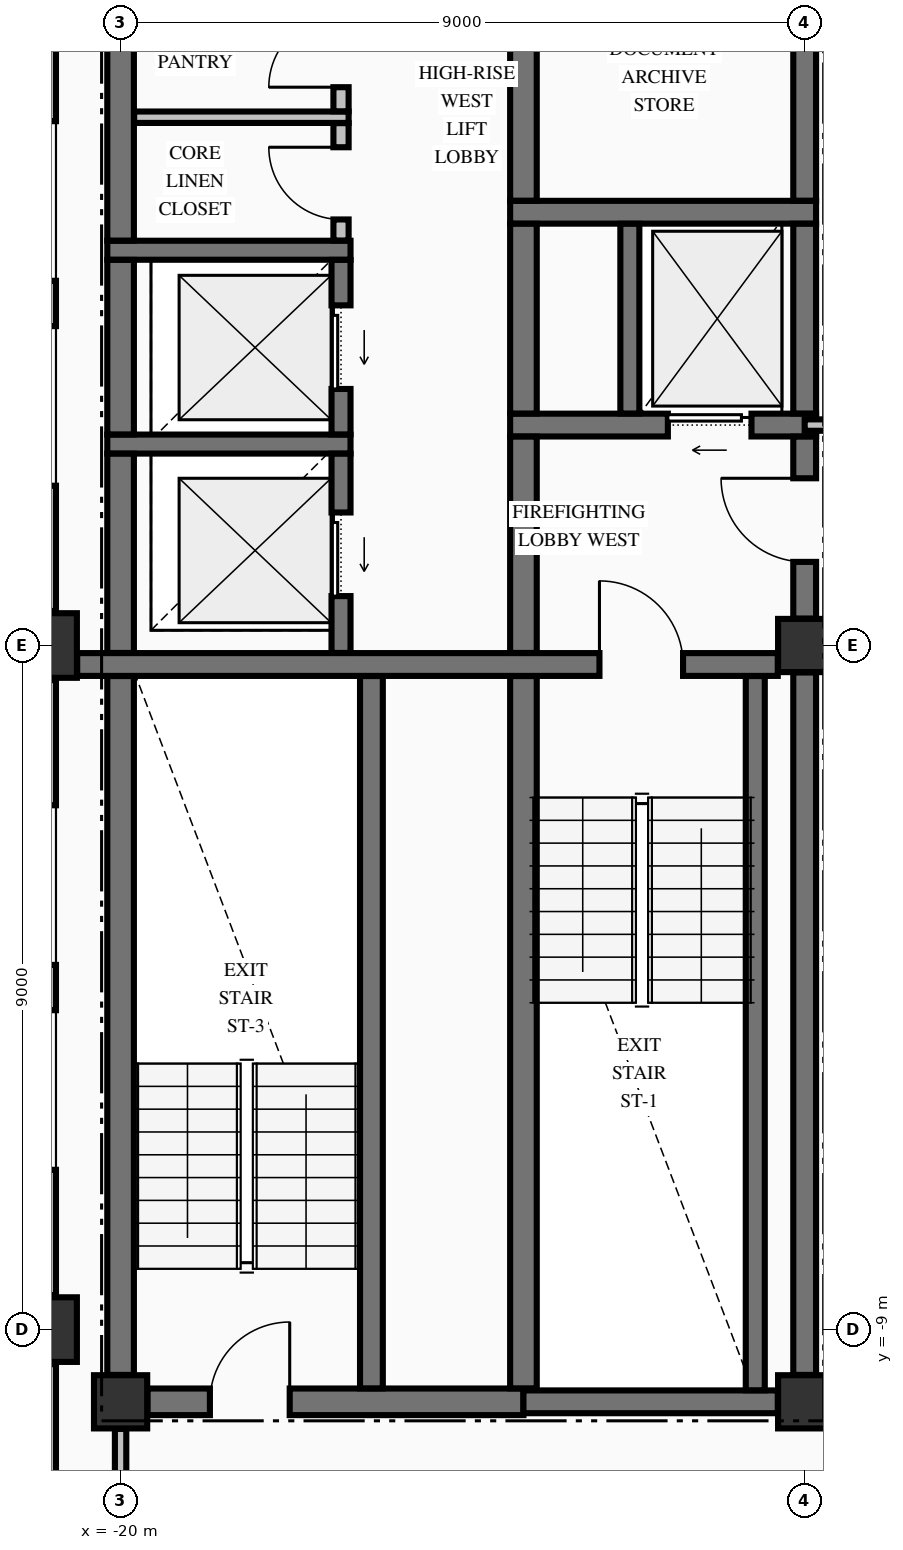
"""IFC4 building model, lengths in metres.
Left out: names, types, materials, properties, quantities, classifications, styles, units other than length and angle.
Written with IfcOpenShell. Run it as: python <this file> out.ifc"""

import sys

from ifc_helpers import new_model, si_unit, direction, frame, frame_2d, origin, origin_2d, place, context, subcontext, project, spatial, rectangle, extrude, element, fill, save


model = new_model("IFC4")
c1 = context("Model", 3, precision=1e-05, world=origin(), true_north=direction((0.0, 1.0)))
c2 = subcontext(c1, "Body", "Model", "MODEL_VIEW")
j1 = project(units=[si_unit("LENGTHUNIT", "METRE"), si_unit("PLANEANGLEUNIT", "RADIAN")], contexts=[c1])
p1 = place(None, origin())
s1 = spatial("IfcSite", under=j1, at=p1, CompositionType="ELEMENT")
p2 = place(p1, origin())
s2 = spatial("IfcBuilding", under=s1, at=p2, CompositionType="ELEMENT")
p3 = place(p2, frame((0.0, 0.0, 242.97)))
s3 = spatial("IfcBuildingStorey", under=s2, at=p3, CompositionType="ELEMENT", Elevation=242.97)
for number, where, z_axis, x_axis in (
    (1, (-21.0, -9.0, -0.25), (0.0, 0.0, 1.0), (1.0, 0.0, 0.0)),
    (2, (-21.0, 0.0, -0.25), (0.0, 0.0, 1.0), (1.0, 0.0, 0.0)),
):
    element("IfcColumn", number, at=place(p3, frame(where, z_axis=z_axis, x_axis=x_axis)), inside=s3, PredefinedType="COLUMN", context=c2, shape_type="SweptSolid", body=[
        extrude(rectangle(XDim=0.85, YDim=0.85, at=origin_2d()), origin(), (0.0, 0.0, 1.0), 3.23),
    ])
for number, where, z_axis, x_axis in (
    (3, (-20.0, -9.95, -0.25), (0.0, 0.0, 1.0), (1.0, 0.0, 0.0)),
    (4, (-11.0, -9.95, -0.25), (0.0, 0.0, 1.0), (1.0, 0.0, 0.0)),
    (5, (-11.0, 0.0, -0.25), (0.0, 0.0, 1.0), (1.0, 0.0, 0.0)),
):
    element("IfcColumn", number, at=place(p3, frame(where, z_axis=z_axis, x_axis=x_axis)), inside=s3, PredefinedType="COLUMN", context=c2, shape_type="SweptSolid", body=[
        extrude(rectangle(XDim=0.7, YDim=0.7, at=origin_2d()), origin(), (0.0, 0.0, 1.0), 3.23),
    ])
p4 = place(p3, frame((-21.0, -9.455, 0.0), z_axis=(0.0, 0.0, 1.0), x_axis=(0.0, -1.0, 0.0)))
e6 = element("IfcWall", 6, at=p4, inside=s3, PredefinedType="STANDARD", context=c2, shape_type="SweptSolid", body=[
    extrude(rectangle(XDim=8.09, YDim=0.3, at=frame_2d((4.045, 0.0))), origin(), (0.0, 0.0, 1.0), 2.372),
])
p5 = place(p3, frame((-21.0, -0.455, 0.0), z_axis=(0.0, 0.0, 1.0), x_axis=(0.0, -1.0, 0.0)))
e7 = element("IfcWall", 7, at=p5, inside=s3, PredefinedType="STANDARD", context=c2, shape_type="SweptSolid", body=[
    extrude(rectangle(XDim=8.09, YDim=0.3, at=frame_2d((4.045, 0.0))), origin(), (0.0, 0.0, 1.0), 2.372),
])
p6 = place(p5, frame((1.647, 0.0, 0.7)))
e8 = element("IfcOpeningElement", 8, at=p6, cuts=e7, PredefinedType="OPENING", context=c2, shape_type="SweptSolid", body=[
    extrude(rectangle(XDim=2.1, YDim=1.5, at=frame_2d((1.05, 0.75))), frame((0.0, 0.16, 0.0), z_axis=(0.0, -1.0, 0.0), x_axis=(1.0, 0.0, 0.0)), (0.0, 0.0, 1.0), 0.32),
])
p7 = place(p5, frame((4.343, 0.0, 0.7)))
e9 = element("IfcOpeningElement", 9, at=p7, cuts=e7, PredefinedType="OPENING", context=c2, shape_type="SweptSolid", body=[
    extrude(rectangle(XDim=2.1, YDim=1.5, at=frame_2d((1.05, 0.75))), frame((0.0, 0.16, 0.0), z_axis=(0.0, -1.0, 0.0), x_axis=(1.0, 0.0, 0.0)), (0.0, 0.0, 1.0), 0.32),
])
p8 = place(p3, frame((-21.0, 8.545, 0.0), z_axis=(0.0, 0.0, 1.0), x_axis=(0.0, -1.0, 0.0)))
e10 = element("IfcWall", 10, at=p8, inside=s3, PredefinedType="STANDARD", context=c2, shape_type="SweptSolid", body=[
    extrude(rectangle(XDim=8.09, YDim=0.3, at=frame_2d((4.045, 0.0))), origin(), (0.0, 0.0, 1.0), 2.372),
])
p9 = place(p8, frame((1.647, 0.0, 0.7)))
e11 = element("IfcOpeningElement", 11, at=p9, cuts=e10, PredefinedType="OPENING", context=c2, shape_type="SweptSolid", body=[
    extrude(rectangle(XDim=2.1, YDim=1.5, at=frame_2d((1.05, 0.75))), frame((0.0, 0.16, 0.0), z_axis=(0.0, -1.0, 0.0), x_axis=(1.0, 0.0, 0.0)), (0.0, 0.0, 1.0), 0.32),
])
p10 = place(p8, frame((4.343, 0.0, 0.7)))
e12 = element("IfcOpeningElement", 12, at=p10, cuts=e10, PredefinedType="OPENING", context=c2, shape_type="SweptSolid", body=[
    extrude(rectangle(XDim=2.1, YDim=1.5, at=frame_2d((1.05, 0.75))), frame((0.0, 0.16, 0.0), z_axis=(0.0, -1.0, 0.0), x_axis=(1.0, 0.0, 0.0)), (0.0, 0.0, 1.0), 0.32),
])
p11 = place(p3, frame((-19.646, -9.95, 0.0), z_axis=(0.0, 0.0, 1.0), x_axis=(1.0, 0.0, 0.0)))
e13 = element("IfcWall", 13, at=p11, inside=s3, PredefinedType="SHEAR", context=c2, shape_type="SweptSolid", body=[
    extrude(rectangle(XDim=4.946, YDim=0.35, at=frame_2d((2.473, 0.0))), origin(), (0.0, 0.0, 1.0), 2.98),
])
p12 = place(p11, frame((0.821, 0.0, 0.0)))
e14 = element("IfcOpeningElement", 14, at=p12, cuts=e13, PredefinedType="OPENING", context=c2, shape_type="SweptSolid", body=[
    extrude(rectangle(XDim=1.05, YDim=2.15, at=frame_2d((0.525, 1.075))), frame((0.0, 0.185, 0.0), z_axis=(0.0, -1.0, 0.0), x_axis=(1.0, 0.0, 0.0)), (0.0, 0.0, 1.0), 0.37),
])
p13 = place(p3, frame((-14.7, -9.95, 0.0), z_axis=(0.0, 0.0, 1.0), x_axis=(1.0, 0.0, 0.0)))
e15 = element("IfcWall", 15, at=p13, inside=s3, PredefinedType="SHEAR", context=c2, shape_type="SweptSolid", body=[
    extrude(rectangle(XDim=3.346, YDim=0.3, at=frame_2d((1.673, 0.0))), origin(), (0.0, 0.0, 1.0), 2.98),
])
p14 = place(p3, frame((-20.571, -0.25, 0.0), z_axis=(0.0, 0.0, 1.0), x_axis=(1.0, 0.0, 0.0)))
e16 = element("IfcWall", 16, at=p14, inside=s3, PredefinedType="SHEAR", context=c2, shape_type="SweptSolid", body=[
    extrude(rectangle(XDim=9.217, YDim=0.3, at=frame_2d((4.608, 0.0))), origin(), (0.0, 0.0, 1.0), 2.98),
])
p15 = place(p14, frame((6.871, 0.0, 0.0)))
e17 = element("IfcOpeningElement", 17, at=p15, cuts=e16, PredefinedType="OPENING", context=c2, shape_type="SweptSolid", body=[
    extrude(rectangle(XDim=1.1, YDim=2.15, at=frame_2d((0.55, 1.075))), frame((0.0, 0.16, 0.0), z_axis=(0.0, -1.0, 0.0), x_axis=(1.0, 0.0, 0.0)), (0.0, 0.0, 1.0), 0.32),
])
p16 = place(p3, frame((-20.175, 2.65, 0.0), z_axis=(0.0, 0.0, 1.0), x_axis=(1.0, 0.0, 0.0)))
e18 = element("IfcWall", 18, at=p16, inside=s3, PredefinedType="SOLIDWALL", context=c2, shape_type="SweptSolid", body=[
    extrude(rectangle(XDim=3.2, YDim=0.25, at=frame_2d((1.6, 0.0))), origin(), (0.0, 0.0, 1.0), 2.98),
])
p17 = place(p3, frame((-14.875, 2.9, 0.0), z_axis=(0.0, 0.0, 1.0), x_axis=(1.0, 0.0, 0.0)))
e19 = element("IfcWall", 19, at=p17, inside=s3, PredefinedType="SHEAR", context=c2, shape_type="SweptSolid", body=[
    extrude(rectangle(XDim=4.025, YDim=0.3, at=frame_2d((2.012, 0.0))), origin(), (0.0, 0.0, 1.0), 2.98),
])
p18 = place(p17, frame((2.075, 0.0, 0.0)))
e20 = element("IfcOpeningElement", 20, at=p18, cuts=e19, PredefinedType="OPENING", context=c2, shape_type="SweptSolid", body=[
    extrude(rectangle(XDim=1.1, YDim=2.2, at=frame_2d((0.55, 1.1))), frame((0.0, 0.16, 0.0), z_axis=(0.0, -1.0, 0.0), x_axis=(1.0, 0.0, 0.0)), (0.0, 0.0, 1.0), 0.32),
])
p19 = place(p3, frame((-20.175, 5.2, 0.0), z_axis=(0.0, 0.0, 1.0), x_axis=(1.0, 0.0, 0.0)))
e21 = element("IfcWall", 21, at=p19, inside=s3, PredefinedType="SOLIDWALL", context=c2, shape_type="SweptSolid", body=[
    extrude(rectangle(XDim=3.2, YDim=0.25, at=frame_2d((1.6, 0.0))), origin(), (0.0, 0.0, 1.0), 2.98),
])
p20 = place(p3, frame((-14.875, 5.7, 0.0), z_axis=(0.0, 0.0, 1.0), x_axis=(1.0, 0.0, 0.0)))
e22 = element("IfcWall", 22, at=p20, inside=s3, PredefinedType="SHEAR", context=c2, shape_type="SweptSolid", body=[
    extrude(rectangle(XDim=4.025, YDim=0.3, at=frame_2d((2.012, 0.0))), origin(), (0.0, 0.0, 1.0), 2.98),
])
p21 = place(p3, frame((-11.0, 2.9, 0.0), z_axis=(0.0, 0.0, 1.0), x_axis=(1.0, 0.0, 0.0)))
e23 = element("IfcWall", 23, at=p21, inside=s3, PredefinedType="PARTITIONING", context=c2, shape_type="SweptSolid", body=[
    extrude(rectangle(XDim=22.0, YDim=0.15, at=frame_2d((11.0, 0.0))), origin(), (0.0, 0.0, 1.0), 2.98),
])
p22 = place(p21, frame((13.9, 0.0, 0.0)))
e24 = element("IfcOpeningElement", 24, at=p22, cuts=e23, PredefinedType="OPENING", context=c2, shape_type="SweptSolid", body=[
    extrude(rectangle(XDim=1.1, YDim=2.15, at=frame_2d((0.55, 1.075))), frame((0.0, 0.085, 0.0), z_axis=(0.0, -1.0, 0.0), x_axis=(1.0, 0.0, 0.0)), (0.0, 0.0, 1.0), 0.17),
])
p23 = place(p21, frame((6.145, 0.0, 0.0)))
e25 = element("IfcOpeningElement", 25, at=p23, cuts=e23, PredefinedType="OPENING", context=c2, shape_type="SweptSolid", body=[
    extrude(rectangle(XDim=1.05, YDim=2.15, at=frame_2d((0.525, 1.075))), frame((0.0, 0.085, 0.0), z_axis=(0.0, -1.0, 0.0), x_axis=(1.0, 0.0, 0.0)), (0.0, 0.0, 1.0), 0.17),
])
p24 = place(p21, frame((18.23, 0.0, 0.0)))
e26 = element("IfcOpeningElement", 26, at=p24, cuts=e23, PredefinedType="OPENING", context=c2, shape_type="SweptSolid", body=[
    extrude(rectangle(XDim=1.1, YDim=2.15, at=frame_2d((0.55, 1.075))), frame((0.0, 0.085, 0.0), z_axis=(0.0, -1.0, 0.0), x_axis=(1.0, 0.0, 0.0)), (0.0, 0.0, 1.0), 0.17),
])
p25 = place(p3, frame((-19.822, 6.95, 0.0), z_axis=(0.0, 0.0, 1.0), x_axis=(1.0, 0.0, 0.0)))
e27 = element("IfcWall", 27, at=p25, inside=s3, PredefinedType="PARTITIONING", context=c2, shape_type="SweptSolid", body=[
    extrude(rectangle(XDim=2.822, YDim=0.15, at=frame_2d((1.411, 0.0))), origin(), (0.0, 0.0, 1.0), 2.98),
])
p26 = place(p3, frame((-20.0, -9.596, 0.0), z_axis=(0.0, 0.0, 1.0), x_axis=(0.0, 1.0, 0.0)))
e28 = element("IfcWall", 28, at=p26, inside=s3, PredefinedType="SHEAR", context=c2, shape_type="SweptSolid", body=[
    extrude(rectangle(XDim=9.194, YDim=0.35, at=frame_2d((4.597, 0.0))), origin(), (0.0, 0.0, 1.0), 2.98),
])
p27 = place(p3, frame((-20.0, -0.098, 0.0), z_axis=(0.0, 0.0, 1.0), x_axis=(0.0, 1.0, 0.0)))
e29 = element("IfcWall", 29, at=p27, inside=s3, PredefinedType="SHEAR", context=c2, shape_type="SweptSolid", body=[
    extrude(rectangle(XDim=2.621, YDim=0.35, at=frame_2d((1.311, 0.0))), origin(), (0.0, 0.0, 1.0), 2.98),
])
p28 = place(p3, frame((-20.0, 2.777, 0.0), z_axis=(0.0, 0.0, 1.0), x_axis=(0.0, 1.0, 0.0)))
e30 = element("IfcWall", 30, at=p28, inside=s3, PredefinedType="SHEAR", context=c2, shape_type="SweptSolid", body=[
    extrude(rectangle(XDim=2.296, YDim=0.35, at=frame_2d((1.148, 0.0))), origin(), (0.0, 0.0, 1.0), 2.98),
])
p29 = place(p3, frame((-20.0, 5.327, 0.0), z_axis=(0.0, 0.0, 1.0), x_axis=(0.0, 1.0, 0.0)))
e31 = element("IfcWall", 31, at=p29, inside=s3, PredefinedType="SHEAR", context=c2, shape_type="SweptSolid", body=[
    extrude(rectangle(XDim=4.819, YDim=0.35, at=frame_2d((2.41, 0.0))), origin(), (0.0, 0.0, 1.0), 2.98),
])
p30 = place(p3, frame((-17.1, -0.098, 0.0), z_axis=(0.0, 0.0, 1.0), x_axis=(0.0, 1.0, 0.0)))
e32 = element("IfcWall", 32, at=p30, inside=s3, PredefinedType="SOLIDWALL", context=c2, shape_type="SweptSolid", body=[
    extrude(rectangle(XDim=2.621, YDim=0.25, at=frame_2d((1.311, 0.0))), origin(), (0.0, 0.0, 1.0), 2.98),
])
p31 = place(p30, frame((0.748, 0.0, 0.0)))
e33 = element("IfcOpeningElement", 33, at=p31, cuts=e32, PredefinedType="OPENING", context=c2, shape_type="SweptSolid", body=[
    extrude(rectangle(XDim=1.1, YDim=2.2, at=frame_2d((0.55, 1.1))), frame((0.0, 0.135, 0.0), z_axis=(0.0, -1.0, 0.0), x_axis=(1.0, 0.0, 0.0)), (0.0, 0.0, 1.0), 0.27),
])
p32 = place(p3, frame((-17.1, 2.777, 0.0), z_axis=(0.0, 0.0, 1.0), x_axis=(0.0, 1.0, 0.0)))
e34 = element("IfcWall", 34, at=p32, inside=s3, PredefinedType="SOLIDWALL", context=c2, shape_type="SweptSolid", body=[
    extrude(rectangle(XDim=2.296, YDim=0.25, at=frame_2d((1.148, 0.0))), origin(), (0.0, 0.0, 1.0), 2.98),
])
p33 = place(p32, frame((0.598, 0.0, 0.0)))
e35 = element("IfcOpeningElement", 35, at=p33, cuts=e34, PredefinedType="OPENING", context=c2, shape_type="SweptSolid", body=[
    extrude(rectangle(XDim=1.1, YDim=2.2, at=frame_2d((0.55, 1.1))), frame((0.0, 0.135, 0.0), z_axis=(0.0, -1.0, 0.0), x_axis=(1.0, 0.0, 0.0)), (0.0, 0.0, 1.0), 0.27),
])
p34 = place(p3, frame((-16.7, -9.773, 0.0), z_axis=(0.0, 0.0, 1.0), x_axis=(0.0, 1.0, 0.0)))
e36 = element("IfcWall", 36, at=p34, inside=s3, PredefinedType="SHEAR", context=c2, shape_type="SweptSolid", body=[
    extrude(rectangle(XDim=9.371, YDim=0.3, at=frame_2d((4.686, 0.0))), origin(), (0.0, 0.0, 1.0), 2.98),
])
p35 = place(p3, frame((-14.7, -9.773, 0.0), z_axis=(0.0, 0.0, 1.0), x_axis=(0.0, 1.0, 0.0)))
e37 = element("IfcWall", 37, at=p35, inside=s3, PredefinedType="SHEAR", context=c2, shape_type="SweptSolid", body=[
    extrude(rectangle(XDim=9.371, YDim=0.35, at=frame_2d((4.686, 0.0))), origin(), (0.0, 0.0, 1.0), 2.98),
])
p36 = place(p3, frame((-14.7, -0.098, 0.0), z_axis=(0.0, 0.0, 1.0), x_axis=(0.0, 1.0, 0.0)))
e38 = element("IfcWall", 38, at=p36, inside=s3, PredefinedType="SHEAR", context=c2, shape_type="SweptSolid", body=[
    extrude(rectangle(XDim=2.846, YDim=0.35, at=frame_2d((1.423, 0.0))), origin(), (0.0, 0.0, 1.0), 2.98),
])
p37 = place(p3, frame((-14.7, 3.052, 0.0), z_axis=(0.0, 0.0, 1.0), x_axis=(0.0, 1.0, 0.0)))
e39 = element("IfcWall", 39, at=p37, inside=s3, PredefinedType="SHEAR", context=c2, shape_type="SweptSolid", body=[
    extrude(rectangle(XDim=2.496, YDim=0.35, at=frame_2d((1.248, 0.0))), origin(), (0.0, 0.0, 1.0), 2.98),
])
p38 = place(p3, frame((-14.7, 5.852, 0.0), z_axis=(0.0, 0.0, 1.0), x_axis=(0.0, 1.0, 0.0)))
e40 = element("IfcWall", 40, at=p38, inside=s3, PredefinedType="SHEAR", context=c2, shape_type="SweptSolid", body=[
    extrude(rectangle(XDim=4.471, YDim=0.35, at=frame_2d((2.235, 0.0))), origin(), (0.0, 0.0, 1.0), 2.98),
])
p39 = place(p3, frame((-13.3, 3.052, 0.0), z_axis=(0.0, 0.0, 1.0), x_axis=(0.0, 1.0, 0.0)))
e41 = element("IfcWall", 41, at=p39, inside=s3, PredefinedType="SOLIDWALL", context=c2, shape_type="SweptSolid", body=[
    extrude(rectangle(XDim=2.496, YDim=0.25, at=frame_2d((1.248, 0.0))), origin(), (0.0, 0.0, 1.0), 2.98),
])
p40 = place(p3, frame((-11.65, -9.798, 0.0), z_axis=(0.0, 0.0, 1.0), x_axis=(0.0, 1.0, 0.0)))
e42 = element("IfcWall", 42, at=p40, inside=s3, PredefinedType="SOLIDWALL", context=c2, shape_type="SweptSolid", body=[
    extrude(rectangle(XDim=9.396, YDim=0.25, at=frame_2d((4.698, 0.0))), origin(), (0.0, 0.0, 1.0), 2.98),
])
p41 = place(p3, frame((-11.0, -9.596, 0.0), z_axis=(0.0, 0.0, 1.0), x_axis=(0.0, 1.0, 0.0)))
e43 = element("IfcWall", 43, at=p41, inside=s3, PredefinedType="SHEAR", context=c2, shape_type="SweptSolid", body=[
    extrude(rectangle(XDim=9.242, YDim=0.3, at=frame_2d((4.621, 0.0))), origin(), (0.0, 0.0, 1.0), 2.98),
])
p42 = place(p3, frame((-11.0, 0.354, 0.0), z_axis=(0.0, 0.0, 1.0), x_axis=(0.0, 1.0, 0.0)))
e44 = element("IfcWall", 44, at=p42, inside=s3, PredefinedType="SHEAR", context=c2, shape_type="SweptSolid", body=[
    extrude(rectangle(XDim=2.394, YDim=0.3, at=frame_2d((1.197, 0.0))), origin(), (0.0, 0.0, 1.0), 2.98),
])
p43 = place(p42, frame((0.746, 0.0, 0.0)))
e45 = element("IfcOpeningElement", 45, at=p43, cuts=e44, PredefinedType="OPENING", context=c2, shape_type="SweptSolid", body=[
    extrude(rectangle(XDim=1.1, YDim=2.15, at=frame_2d((0.55, 1.075))), frame((0.0, 0.16, 0.0), z_axis=(0.0, -1.0, 0.0), x_axis=(1.0, 0.0, 0.0)), (0.0, 0.0, 1.0), 0.32),
])
p44 = place(p3, frame((-11.0, 3.052, 0.0), z_axis=(0.0, 0.0, 1.0), x_axis=(0.0, 1.0, 0.0)))
e46 = element("IfcWall", 46, at=p44, inside=s3, PredefinedType="SHEAR", context=c2, shape_type="SweptSolid", body=[
    extrude(rectangle(XDim=2.496, YDim=0.3, at=frame_2d((1.248, 0.0))), origin(), (0.0, 0.0, 1.0), 2.98),
])
p45 = place(p3, frame((-11.0, 5.852, 0.0), z_axis=(0.0, 0.0, 1.0), x_axis=(0.0, 1.0, 0.0)))
e47 = element("IfcWall", 47, at=p45, inside=s3, PredefinedType="SHEAR", context=c2, shape_type="SweptSolid", body=[
    extrude(rectangle(XDim=4.294, YDim=0.3, at=frame_2d((2.147, 0.0))), origin(), (0.0, 0.0, 1.0), 2.98),
])
p46 = place(p3, frame((-20.0, -12.122, 0.0), z_axis=(0.0, 0.0, 1.0), x_axis=(0.0, 1.0, 0.0)))
e48 = element("IfcWall", 48, at=p46, inside=s3, PredefinedType="PARTITIONING", context=c2, shape_type="SweptSolid", body=[
    extrude(rectangle(XDim=1.816, YDim=0.15, at=frame_2d((0.908, 0.0))), origin(), (0.0, 0.0, 1.0), 2.57),
])
p47 = place(p3, frame((-17.1, 5.328, 0.0), z_axis=(0.0, 0.0, 1.0), x_axis=(0.0, 1.0, 0.0)))
e49 = element("IfcWall", 49, at=p47, inside=s3, PredefinedType="PARTITIONING", context=c2, shape_type="SweptSolid", body=[
    extrude(rectangle(XDim=1.544, YDim=0.2, at=frame_2d((0.772, 0.0))), origin(), (0.0, 0.0, 1.0), 2.98),
])
p48 = place(p47, frame((0.277, 0.0, 0.0)))
e50 = element("IfcOpeningElement", 50, at=p48, cuts=e49, PredefinedType="OPENING", context=c2, shape_type="SweptSolid", body=[
    extrude(rectangle(XDim=0.95, YDim=2.15, at=frame_2d((0.475, 1.075))), frame((0.0, 0.11, 0.0), z_axis=(0.0, -1.0, 0.0), x_axis=(1.0, 0.0, 0.0)), (0.0, 0.0, 1.0), 0.22),
])
p49 = place(p3, frame((-17.1, 7.028, 0.0), z_axis=(0.0, 0.0, 1.0), x_axis=(0.0, 1.0, 0.0)))
e51 = element("IfcWall", 51, at=p49, inside=s3, PredefinedType="PARTITIONING", context=c2, shape_type="SweptSolid", body=[
    extrude(rectangle(XDim=1.594, YDim=0.2, at=frame_2d((0.797, 0.0))), origin(), (0.0, 0.0, 1.0), 2.98),
])
p50 = place(p49, frame((0.317, 0.0, 0.0)))
e52 = element("IfcOpeningElement", 52, at=p50, cuts=e51, PredefinedType="OPENING", context=c2, shape_type="SweptSolid", body=[
    extrude(rectangle(XDim=0.95, YDim=2.15, at=frame_2d((0.475, 1.075))), frame((0.0, 0.11, 0.0), z_axis=(0.0, -1.0, 0.0), x_axis=(1.0, 0.0, 0.0)), (0.0, 0.0, 1.0), 0.22),
])
p51 = place(p15, origin())
e53 = element("IfcDoor", 53, at=p51, inside=s3, OperationType="SINGLE_SWING_LEFT", PredefinedType="DOOR", context=c2, shape_type="SweptSolid", body=[
    extrude(rectangle(XDim=1.1, YDim=2.15, at=frame_2d((0.55, 1.075))), frame((0.0, 0.025, 0.0), z_axis=(0.0, -1.0, 0.0), x_axis=(1.0, 0.0, 0.0)), (0.0, 0.0, 1.0), 0.05),
])
fill(e17, e53)
p52 = place(p43, origin())
e54 = element("IfcDoor", 54, at=p52, inside=s3, OperationType="SINGLE_SWING_RIGHT", PredefinedType="DOOR", context=c2, shape_type="SweptSolid", body=[
    extrude(rectangle(XDim=1.1, YDim=2.15, at=frame_2d((0.55, 1.075))), frame((0.0, 0.025, 0.0), z_axis=(0.0, -1.0, 0.0), x_axis=(1.0, 0.0, 0.0)), (0.0, 0.0, 1.0), 0.05),
])
fill(e45, e54)
p53 = place(p18, origin())
e55 = element("IfcDoor", 55, at=p53, inside=s3, OperationType="SLIDING_TO_LEFT", PredefinedType="DOOR", context=c2, shape_type="SweptSolid", body=[
    extrude(rectangle(XDim=1.1, YDim=2.2, at=frame_2d((0.55, 1.1))), frame((0.0, 0.025, 0.0), z_axis=(0.0, -1.0, 0.0), x_axis=(1.0, 0.0, 0.0)), (0.0, 0.0, 1.0), 0.05),
])
fill(e20, e55)
p54 = place(p12, origin())
e56 = element("IfcDoor", 56, at=p54, inside=s3, OperationType="SINGLE_SWING_RIGHT", PredefinedType="DOOR", context=c2, shape_type="SweptSolid", body=[
    extrude(rectangle(XDim=1.05, YDim=2.15, at=frame_2d((0.525, 1.075))), frame((0.0, 0.025, 0.0), z_axis=(0.0, -1.0, 0.0), x_axis=(1.0, 0.0, 0.0)), (0.0, 0.0, 1.0), 0.05),
])
fill(e14, e56)
p55 = place(p31, origin())
e57 = element("IfcDoor", 57, at=p55, inside=s3, OperationType="SLIDING_TO_LEFT", PredefinedType="DOOR", context=c2, shape_type="SweptSolid", body=[
    extrude(rectangle(XDim=1.1, YDim=2.2, at=frame_2d((0.55, 1.1))), frame((0.0, 0.025, 0.0), z_axis=(0.0, -1.0, 0.0), x_axis=(1.0, 0.0, 0.0)), (0.0, 0.0, 1.0), 0.05),
])
fill(e33, e57)
p56 = place(p33, origin())
e58 = element("IfcDoor", 58, at=p56, inside=s3, OperationType="SLIDING_TO_LEFT", PredefinedType="DOOR", context=c2, shape_type="SweptSolid", body=[
    extrude(rectangle(XDim=1.1, YDim=2.2, at=frame_2d((0.55, 1.1))), frame((0.0, 0.025, 0.0), z_axis=(0.0, -1.0, 0.0), x_axis=(1.0, 0.0, 0.0)), (0.0, 0.0, 1.0), 0.05),
])
fill(e35, e58)
p57 = place(p50, origin())
e59 = element("IfcDoor", 59, at=p57, inside=s3, OperationType="SINGLE_SWING_LEFT", PredefinedType="DOOR", context=c2, shape_type="SweptSolid", body=[
    extrude(rectangle(XDim=0.95, YDim=2.15, at=frame_2d((0.475, 1.075))), frame((0.0, 0.025, 0.0), z_axis=(0.0, -1.0, 0.0), x_axis=(1.0, 0.0, 0.0)), (0.0, 0.0, 1.0), 0.05),
])
fill(e52, e59)
p58 = place(p48, origin())
e60 = element("IfcDoor", 60, at=p58, inside=s3, OperationType="SINGLE_SWING_RIGHT", PredefinedType="DOOR", context=c2, shape_type="SweptSolid", body=[
    extrude(rectangle(XDim=0.95, YDim=2.15, at=frame_2d((0.475, 1.075))), frame((0.0, 0.025, 0.0), z_axis=(0.0, -1.0, 0.0), x_axis=(1.0, 0.0, 0.0)), (0.0, 0.0, 1.0), 0.05),
])
fill(e50, e60)
save(model, sys.argv[1])
